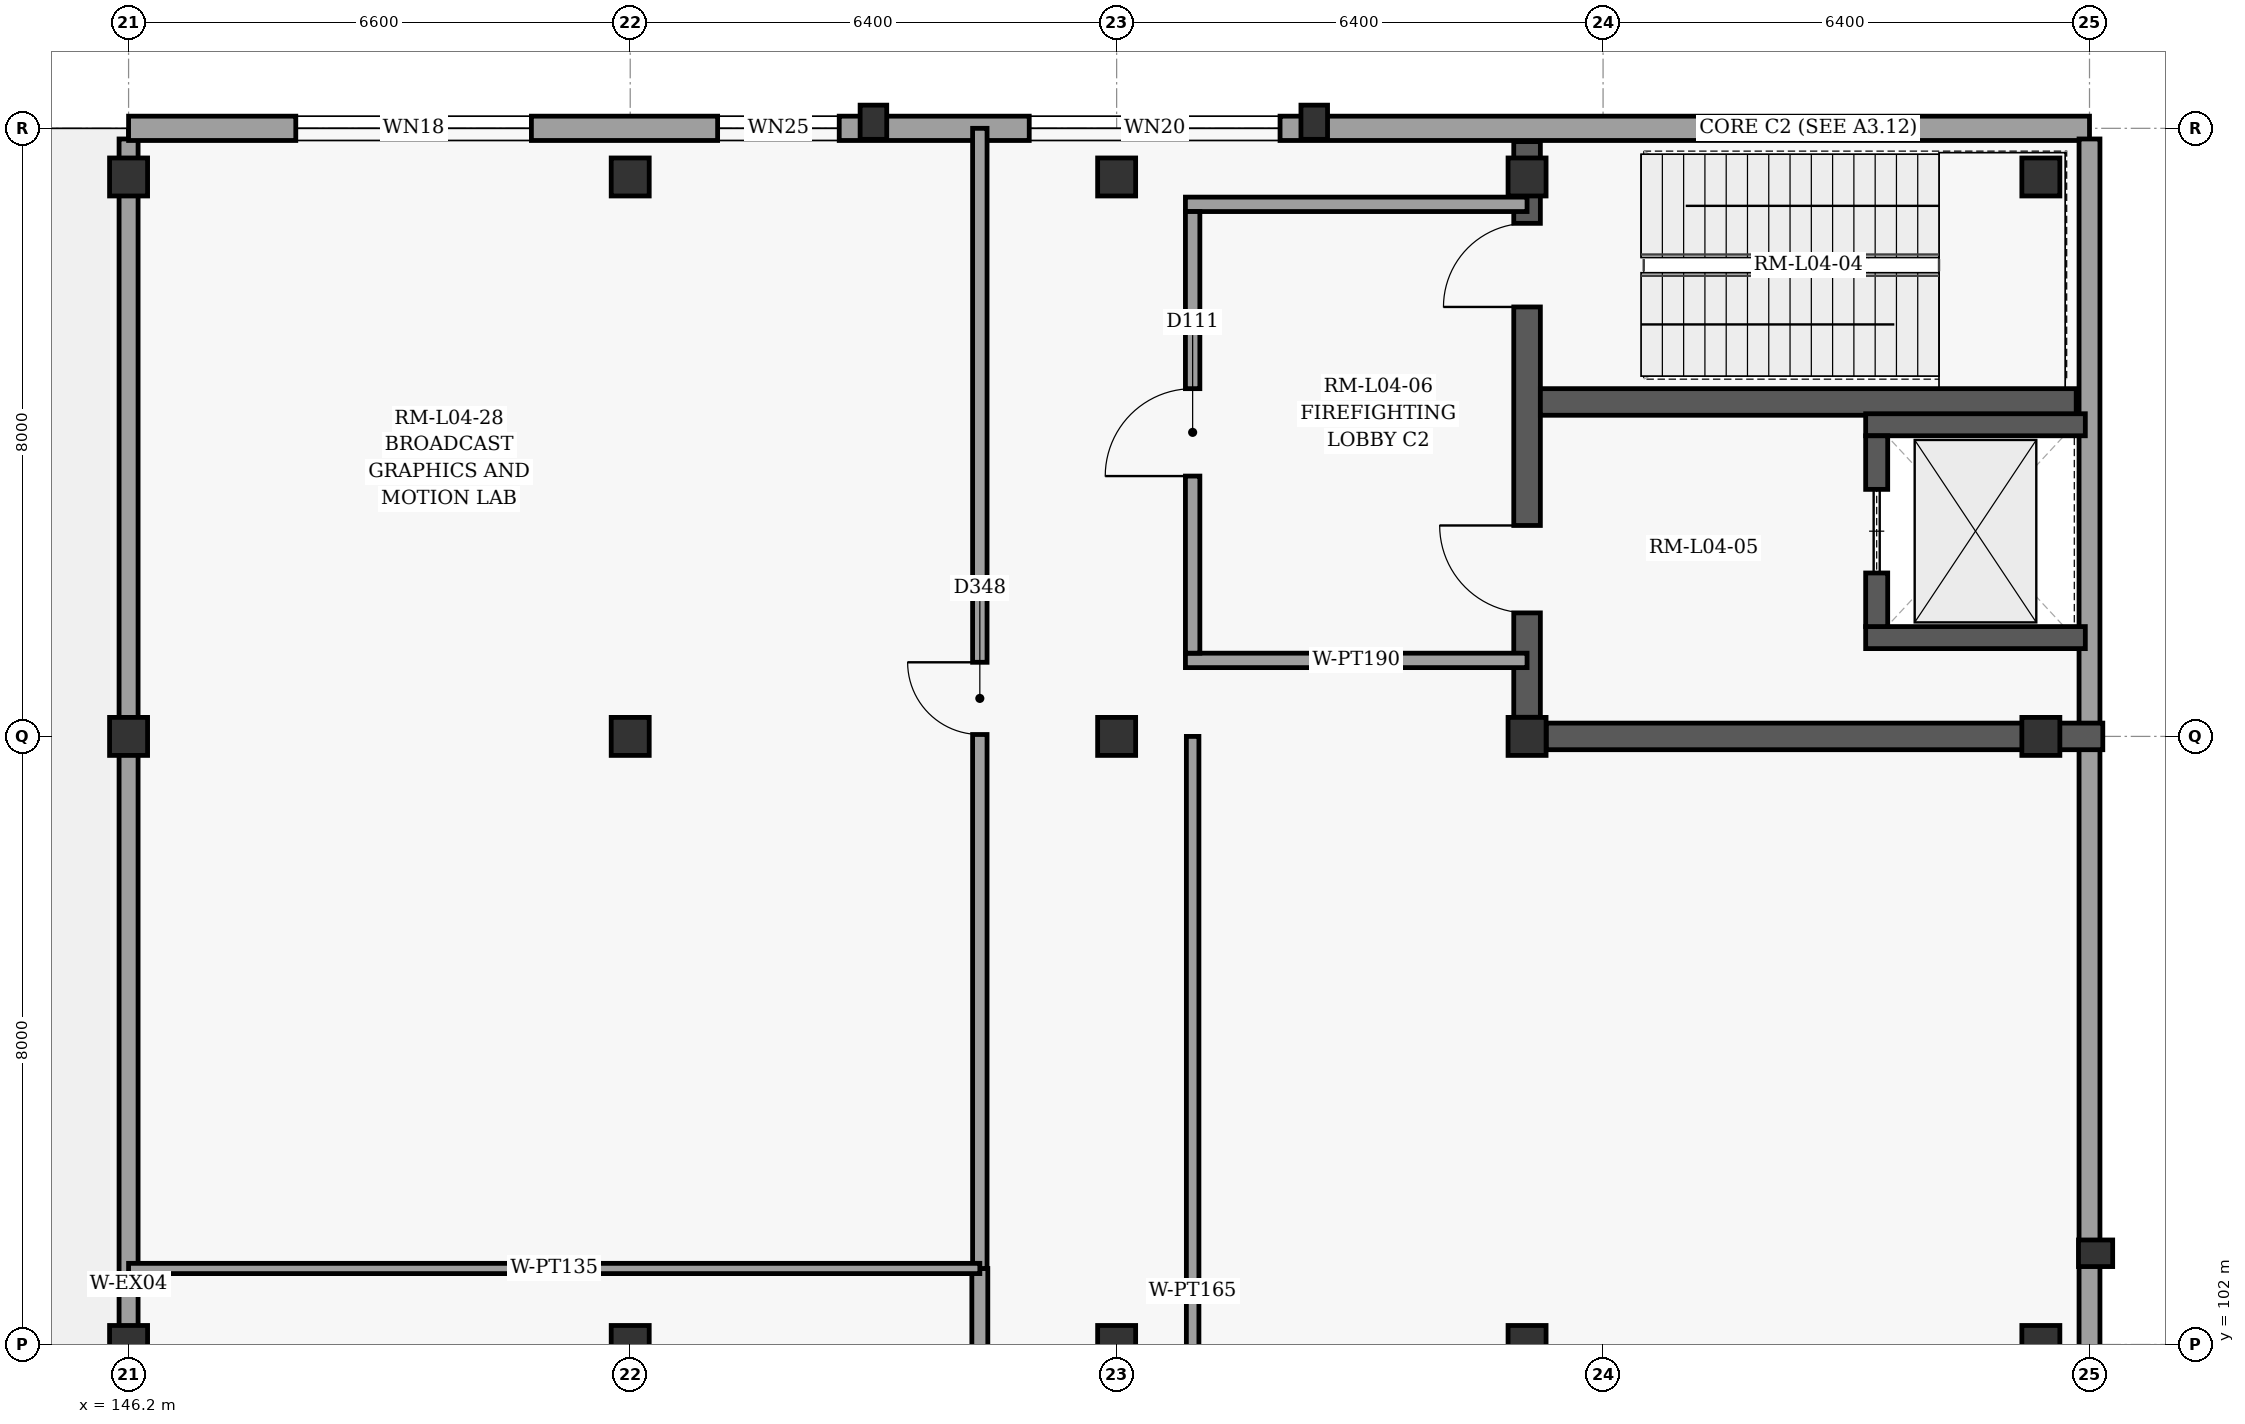
"""IFC4 building model, lengths in metres.
Left out: names, types, materials, properties, quantities, classifications, styles, units other than length and angle.
Written with IfcOpenShell. Run it as: python <this file> out.ifc"""

import sys

from ifc_helpers import new_model, si_unit, direction, frame, frame_2d, origin, origin_2d, place, context, subcontext, project, spatial, rectangle, extrude, element, fill, save


model = new_model("IFC4")
c1 = context("Model", 3, precision=1e-05, world=origin(), true_north=direction((0.0, 1.0)))
c2 = subcontext(c1, "Body", "Model", "MODEL_VIEW")
j1 = project(units=[si_unit("LENGTHUNIT", "METRE"), si_unit("PLANEANGLEUNIT", "RADIAN")], contexts=[c1])
p1 = place(None, origin())
s1 = spatial("IfcSite", under=j1, at=p1, CompositionType="ELEMENT")
p2 = place(p1, origin())
s2 = spatial("IfcBuilding", under=s1, at=p2, CompositionType="ELEMENT")
p3 = place(p2, frame((0.0, 0.0, 20.4)))
s3 = spatial("IfcBuildingStorey", under=s2, at=p3, CompositionType="ELEMENT", Elevation=20.4)
for number, where, z_axis, x_axis in (
    (1, (146.2, 102.0, 0.0), (0.0, 0.0, 1.0), (1.0, 0.0, 0.0)),
    (2, (146.2, 110.0, 0.0), (0.0, 0.0, 1.0), (1.0, 0.0, 0.0)),
    (3, (146.2, 117.36, 0.0), (0.0, 0.0, 1.0), (1.0, 0.0, 0.0)),
    (4, (152.8, 102.0, 0.0), (0.0, 0.0, 1.0), (1.0, 0.0, 0.0)),
    (5, (152.8, 110.0, 0.0), (0.0, 0.0, 1.0), (1.0, 0.0, 0.0)),
    (6, (152.8, 117.36, 0.0), (0.0, 0.0, 1.0), (1.0, 0.0, 0.0)),
    (7, (159.2, 102.0, 0.0), (0.0, 0.0, 1.0), (1.0, 0.0, 0.0)),
    (8, (159.2, 110.0, 0.0), (0.0, 0.0, 1.0), (1.0, 0.0, 0.0)),
    (9, (159.2, 117.36, 0.0), (0.0, 0.0, 1.0), (1.0, 0.0, 0.0)),
    (10, (164.6, 102.0, 0.0), (0.0, 0.0, 1.0), (1.0, 0.0, 0.0)),
    (11, (164.6, 110.0, 0.0), (0.0, 0.0, 1.0), (1.0, 0.0, 0.0)),
    (12, (164.6, 117.36, 0.0), (0.0, 0.0, 1.0), (1.0, 0.0, 0.0)),
    (13, (171.36, 102.0, 0.0), (0.0, 0.0, 1.0), (1.0, 0.0, 0.0)),
    (14, (171.36, 110.0, 0.0), (0.0, 0.0, 1.0), (1.0, 0.0, 0.0)),
    (15, (171.36, 117.36, 0.0), (0.0, 0.0, 1.0), (1.0, 0.0, 0.0)),
):
    element("IfcColumn", number, at=place(p3, frame(where, z_axis=z_axis, x_axis=x_axis)), inside=s3, PredefinedType="COLUMN", context=c2, shape_type="SweptSolid", body=[
        extrude(rectangle(XDim=0.5, YDim=0.5, at=origin_2d()), origin(), (0.0, 0.0, 1.0), 4.5),
    ])
for number, where, z_axis, x_axis in (
    (16, (172.08, 103.2, 0.0), (0.0, 0.0, 1.0), (1.0, 0.0, 0.0)),
    (17, (156.0, 118.08, 0.0), (0.0, 0.0, 1.0), (0.0, 1.0, 0.0)),
    (18, (161.8, 118.08, 0.0), (0.0, 0.0, 1.0), (0.0, 1.0, 0.0)),
):
    element("IfcColumn", number, at=place(p3, frame(where, z_axis=z_axis, x_axis=x_axis)), inside=s3, PredefinedType="PILASTER", context=c2, shape_type="SweptSolid", body=[
        extrude(rectangle(XDim=0.35, YDim=0.45, at=origin_2d()), origin(), (0.0, 0.0, 1.0), 4.5),
    ])
p4 = place(p3, frame((146.2, 87.74, 0.0), z_axis=(0.0, 0.0, 1.0), x_axis=(0.0, 1.0, 0.0)))
e19 = element("IfcWall", 19, at=p4, inside=s3, PredefinedType="SOLIDWALL", context=c2, shape_type="SweptSolid", body=[
    extrude(rectangle(XDim=30.12, YDim=0.25, at=frame_2d((15.06, 0.0))), origin(), (0.0, 0.0, 1.0), 3.45),
])
p5 = place(p3, frame((146.2, 118.0, 0.0), z_axis=(0.0, 0.0, 1.0), x_axis=(1.0, 0.0, 0.0)))
e20 = element("IfcWall", 20, at=p5, inside=s3, PredefinedType="SOLIDWALL", context=c2, shape_type="SweptSolid", body=[
    extrude(rectangle(XDim=25.8, YDim=0.32, at=frame_2d((12.9, 0.0))), origin(), (0.0, 0.0, 1.0), 4.3),
])
p6 = place(p5, frame((2.2, 0.0, 0.9)))
e21 = element("IfcOpeningElement", 21, at=p6, cuts=e20, PredefinedType="OPENING", context=c2, shape_type="SweptSolid", body=[
    extrude(rectangle(XDim=3.1, YDim=2.45, at=frame_2d((1.55, 1.225))), frame((0.0, 0.17, 0.0), z_axis=(0.0, -1.0, 0.0), x_axis=(1.0, 0.0, 0.0)), (0.0, 0.0, 1.0), 0.34),
])
p7 = place(p5, frame((7.75, 0.0, 0.9)))
e22 = element("IfcOpeningElement", 22, at=p7, cuts=e20, PredefinedType="OPENING", context=c2, shape_type="SweptSolid", body=[
    extrude(rectangle(XDim=1.6, YDim=1.65, at=frame_2d((0.8, 0.825))), frame((0.0, 0.17, 0.0), z_axis=(0.0, -1.0, 0.0), x_axis=(1.0, 0.0, 0.0)), (0.0, 0.0, 1.0), 0.34),
])
p8 = place(p5, frame((11.85, 0.0, 0.9)))
e23 = element("IfcOpeningElement", 23, at=p8, cuts=e20, PredefinedType="OPENING", context=c2, shape_type="SweptSolid", body=[
    extrude(rectangle(XDim=3.3, YDim=2.5, at=frame_2d((1.65, 1.25))), frame((0.0, 0.17, 0.0), z_axis=(0.0, -1.0, 0.0), x_axis=(1.0, 0.0, 0.0)), (0.0, 0.0, 1.0), 0.34),
])
p9 = place(p3, frame((172.0, 117.86, 0.0), z_axis=(0.0, 0.0, 1.0), x_axis=(0.0, -1.0, 0.0)))
e24 = element("IfcWall", 24, at=p9, inside=s3, PredefinedType="SOLIDWALL", context=c2, shape_type="SweptSolid", body=[
    extrude(rectangle(XDim=46.12, YDim=0.275, at=frame_2d((23.06, 0.0))), origin(), (0.0, 0.0, 1.0), 4.3),
])
p10 = place(p3, frame((164.852, 110.0, 0.0), z_axis=(0.0, 0.0, 1.0), x_axis=(1.0, 0.0, 0.0)))
e25 = element("IfcWall", 25, at=p10, inside=s3, PredefinedType="SHEAR", context=c2, shape_type="SweptSolid", body=[
    extrude(rectangle(XDim=7.323, YDim=0.35, at=frame_2d((3.662, 0.0))), origin(), (0.0, 0.0, 1.0), 4.3),
])
p11 = place(p3, frame((164.6, 110.252, 0.0), z_axis=(0.0, 0.0, 1.0), x_axis=(0.0, 1.0, 0.0)))
e26 = element("IfcWall", 26, at=p11, inside=s3, PredefinedType="SHEAR", context=c2, shape_type="SweptSolid", body=[
    extrude(rectangle(XDim=7.573, YDim=0.35, at=frame_2d((3.787, 0.0))), origin(), (0.0, 0.0, 1.0), 4.3),
])
p12 = place(p11, frame((5.398, 0.0, 0.0)))
e27 = element("IfcOpeningElement", 27, at=p12, cuts=e26, PredefinedType="OPENING", context=c2, shape_type="SweptSolid", body=[
    extrude(rectangle(XDim=1.1, YDim=2.15, at=frame_2d((0.55, 1.075))), frame((0.0, 0.185, 0.0), z_axis=(0.0, -1.0, 0.0), x_axis=(1.0, 0.0, 0.0)), (0.0, 0.0, 1.0), 0.37),
])
p13 = place(p11, frame((1.373, 0.0, 0.0)))
e28 = element("IfcOpeningElement", 28, at=p13, cuts=e26, PredefinedType="OPENING", context=c2, shape_type="SweptSolid", body=[
    extrude(rectangle(XDim=1.15, YDim=2.2, at=frame_2d((0.575, 1.1))), frame((0.0, 0.185, 0.0), z_axis=(0.0, -1.0, 0.0), x_axis=(1.0, 0.0, 0.0)), (0.0, 0.0, 1.0), 0.37),
])
p14 = place(p3, frame((164.775, 114.4, 0.0), z_axis=(0.0, 0.0, 1.0), x_axis=(1.0, 0.0, 0.0)))
e29 = element("IfcWall", 29, at=p14, inside=s3, PredefinedType="SHEAR", context=c2, shape_type="SweptSolid", body=[
    extrude(rectangle(XDim=7.05, YDim=0.35, at=frame_2d((3.525, 0.0))), origin(), (0.0, 0.0, 1.0), 4.3),
])
for number, where, z_axis, x_axis in (
    (30, (169.055, 111.3, 0.0), (0.0, 0.0, 1.0), (1.0, 0.0, 0.0)),
    (31, (169.055, 114.1, 0.0), (0.0, 0.0, 1.0), (1.0, 0.0, 0.0)),
):
    element("IfcWall", number, at=place(p3, frame(where, z_axis=z_axis, x_axis=x_axis)), inside=s3, PredefinedType="SHEAR", context=c2, shape_type="SweptSolid", body=[
        extrude(rectangle(XDim=2.89, YDim=0.29, at=frame_2d((1.445, 0.0))), origin(), (0.0, 0.0, 1.0), 4.3),
    ])
p15 = place(p3, frame((169.2, 111.445, 0.0), z_axis=(0.0, 0.0, 1.0), x_axis=(0.0, 1.0, 0.0)))
e32 = element("IfcWall", 32, at=p15, inside=s3, PredefinedType="SHEAR", context=c2, shape_type="SweptSolid", body=[
    extrude(rectangle(XDim=2.51, YDim=0.29, at=frame_2d((1.255, 0.0))), origin(), (0.0, 0.0, 1.0), 4.3),
])
p16 = place(p15, frame((0.705, 0.0, 0.0)))
e33 = element("IfcOpeningElement", 33, at=p16, cuts=e32, PredefinedType="OPENING", context=c2, shape_type="SweptSolid", body=[
    extrude(rectangle(XDim=1.1, YDim=2.15, at=frame_2d((0.55, 1.075))), frame((0.0, 0.155, 0.0), z_axis=(0.0, -1.0, 0.0), x_axis=(1.0, 0.0, 0.0)), (0.0, 0.0, 1.0), 0.31),
])
p17 = place(p3, frame((160.105, 111.0, 0.0), z_axis=(0.0, 0.0, 1.0), x_axis=(1.0, 0.0, 0.0)))
e34 = element("IfcWall", 34, at=p17, inside=s3, PredefinedType="PARTITIONING", context=c2, shape_type="SweptSolid", body=[
    extrude(rectangle(XDim=4.495, YDim=0.19, at=frame_2d((2.248, 0.0))), origin(), (0.0, 0.0, 1.0), 4.3),
])
p18 = place(p3, frame((160.105, 117.0, 0.0), z_axis=(0.0, 0.0, 1.0), x_axis=(1.0, 0.0, 0.0)))
e35 = element("IfcWall", 35, at=p18, inside=s3, PredefinedType="PARTITIONING", context=c2, shape_type="SweptSolid", body=[
    extrude(rectangle(XDim=4.495, YDim=0.19, at=frame_2d((2.248, 0.0))), origin(), (0.0, 0.0, 1.0), 3.65),
])
p19 = place(p3, frame((160.2, 111.095, 0.0), z_axis=(0.0, 0.0, 1.0), x_axis=(0.0, 1.0, 0.0)))
e36 = element("IfcWall", 36, at=p19, inside=s3, PredefinedType="PARTITIONING", context=c2, shape_type="SweptSolid", body=[
    extrude(rectangle(XDim=5.81, YDim=0.19, at=frame_2d((2.905, 0.0))), origin(), (0.0, 0.0, 1.0), 4.3),
])
p20 = place(p19, frame((2.33, 0.0, 0.0)))
e37 = element("IfcOpeningElement", 37, at=p20, cuts=e36, PredefinedType="OPENING", context=c2, shape_type="SweptSolid", body=[
    extrude(rectangle(XDim=1.15, YDim=2.2, at=frame_2d((0.575, 1.1))), frame((0.0, 0.105, 0.0), z_axis=(0.0, -1.0, 0.0), x_axis=(1.0, 0.0, 0.0)), (0.0, 0.0, 1.0), 0.21),
])
p21 = place(p3, frame((157.4, 87.6, 0.0), z_axis=(0.0, 0.0, 1.0), x_axis=(0.0, 1.0, 0.0)))
e38 = element("IfcWall", 38, at=p21, inside=s3, PredefinedType="PARTITIONING", context=c2, shape_type="SweptSolid", body=[
    extrude(rectangle(XDim=15.4, YDim=0.21, at=frame_2d((7.7, 0.0))), origin(), (0.0, 0.0, 1.0), 4.3),
])
p22 = place(p21, frame((7.24, 0.0, 0.0)))
e39 = element("IfcOpeningElement", 39, at=p22, cuts=e38, PredefinedType="OPENING", context=c2, shape_type="SweptSolid", body=[
    extrude(rectangle(XDim=0.92, YDim=2.1, at=frame_2d((0.46, 1.05))), frame((0.0, 0.115, 0.0), z_axis=(0.0, -1.0, 0.0), x_axis=(1.0, 0.0, 0.0)), (0.0, 0.0, 1.0), 0.23),
])
p23 = place(p3, frame((157.4, 103.0, 0.0), z_axis=(0.0, 0.0, 1.0), x_axis=(0.0, 1.0, 0.0)))
e40 = element("IfcWall", 40, at=p23, inside=s3, PredefinedType="PARTITIONING", context=c2, shape_type="SweptSolid", body=[
    extrude(rectangle(XDim=15.0, YDim=0.19, at=frame_2d((7.5, 0.0))), origin(), (0.0, 0.0, 1.0), 4.3),
])
p24 = place(p23, frame((7.025, 0.0, 0.0)))
e41 = element("IfcOpeningElement", 41, at=p24, cuts=e40, PredefinedType="OPENING", context=c2, shape_type="SweptSolid", body=[
    extrude(rectangle(XDim=0.95, YDim=2.1, at=frame_2d((0.475, 1.05))), frame((0.0, 0.105, 0.0), z_axis=(0.0, -1.0, 0.0), x_axis=(1.0, 0.0, 0.0)), (0.0, 0.0, 1.0), 0.21),
])
p25 = place(p3, frame((160.2, 110.0, 0.0), z_axis=(0.0, 0.0, 1.0), x_axis=(0.0, -1.0, 0.0)))
e42 = element("IfcWall", 42, at=p25, inside=s3, PredefinedType="PARTITIONING", context=c2, shape_type="SweptSolid", body=[
    extrude(rectangle(XDim=30.4, YDim=0.165, at=frame_2d((15.2, 0.0))), origin(), (0.0, 0.0, 1.0), 4.3),
])
p26 = place(p25, frame((14.58, 0.0, 0.0)))
e43 = element("IfcOpeningElement", 43, at=p26, cuts=e42, PredefinedType="OPENING", context=c2, shape_type="SweptSolid", body=[
    extrude(rectangle(XDim=1.02, YDim=2.1, at=frame_2d((0.51, 1.05))), frame((0.0, 0.093, 0.0), z_axis=(0.0, -1.0, 0.0), x_axis=(1.0, 0.0, 0.0)), (0.0, 0.0, 1.0), 0.185),
])
p27 = place(p25, frame((23.202, 0.0, 0.0)))
e44 = element("IfcOpeningElement", 44, at=p27, cuts=e42, PredefinedType="OPENING", context=c2, shape_type="SweptSolid", body=[
    extrude(rectangle(XDim=1.02, YDim=2.1, at=frame_2d((0.51, 1.05))), frame((0.0, 0.093, 0.0), z_axis=(0.0, -1.0, 0.0), x_axis=(1.0, 0.0, 0.0)), (0.0, 0.0, 1.0), 0.185),
])
p28 = place(p3, frame((146.2, 103.0, 0.0), z_axis=(0.0, 0.0, 1.0), x_axis=(1.0, 0.0, 0.0)))
e45 = element("IfcWall", 45, at=p28, inside=s3, PredefinedType="PARTITIONING", context=c2, shape_type="SweptSolid", body=[
    extrude(rectangle(XDim=11.2, YDim=0.135, at=frame_2d((5.6, 0.0))), origin(), (0.0, 0.0, 1.0), 4.3),
])
p29 = place(p6, origin())
e46 = element("IfcWindow", 46, at=p29, inside=s3, PartitioningType="SINGLE_PANEL", PredefinedType="WINDOW", context=c2, shape_type="SweptSolid", body=[
    extrude(rectangle(XDim=3.1, YDim=2.45, at=frame_2d((1.55, 1.225))), frame((0.0, 0.03, 0.0), z_axis=(0.0, -1.0, 0.0), x_axis=(1.0, 0.0, 0.0)), (0.0, 0.0, 1.0), 0.06),
])
fill(e21, e46)
p30 = place(p7, origin())
e47 = element("IfcWindow", 47, at=p30, inside=s3, PartitioningType="SINGLE_PANEL", PredefinedType="WINDOW", context=c2, shape_type="SweptSolid", body=[
    extrude(rectangle(XDim=1.6, YDim=1.65, at=frame_2d((0.8, 0.825))), frame((0.0, 0.03, 0.0), z_axis=(0.0, -1.0, 0.0), x_axis=(1.0, 0.0, 0.0)), (0.0, 0.0, 1.0), 0.06),
])
fill(e22, e47)
p31 = place(p8, origin())
e48 = element("IfcWindow", 48, at=p31, inside=s3, PartitioningType="SINGLE_PANEL", PredefinedType="WINDOW", context=c2, shape_type="SweptSolid", body=[
    extrude(rectangle(XDim=3.3, YDim=2.5, at=frame_2d((1.65, 1.25))), frame((0.0, 0.03, 0.0), z_axis=(0.0, -1.0, 0.0), x_axis=(1.0, 0.0, 0.0)), (0.0, 0.0, 1.0), 0.06),
])
fill(e23, e48)
p32 = place(p12, origin())
e49 = element("IfcDoor", 49, at=p32, inside=s3, OperationType="SINGLE_SWING_LEFT", PredefinedType="DOOR", context=c2, shape_type="SweptSolid", body=[
    extrude(rectangle(XDim=1.1, YDim=2.15, at=frame_2d((0.55, 1.075))), frame((0.0, 0.025, 0.0), z_axis=(0.0, -1.0, 0.0), x_axis=(1.0, 0.0, 0.0)), (0.0, 0.0, 1.0), 0.05),
])
fill(e27, e49)
p33 = place(p13, origin())
e50 = element("IfcDoor", 50, at=p33, inside=s3, OperationType="SINGLE_SWING_RIGHT", PredefinedType="DOOR", context=c2, shape_type="SweptSolid", body=[
    extrude(rectangle(XDim=1.15, YDim=2.2, at=frame_2d((0.575, 1.1))), frame((0.0, 0.025, 0.0), z_axis=(0.0, -1.0, 0.0), x_axis=(1.0, 0.0, 0.0)), (0.0, 0.0, 1.0), 0.05),
])
fill(e28, e50)
p34 = place(p16, origin())
e51 = element("IfcDoor", 51, at=p34, inside=s3, OperationType="SLIDING_TO_LEFT", PredefinedType="DOOR", context=c2, shape_type="SweptSolid", body=[
    extrude(rectangle(XDim=1.1, YDim=2.15, at=frame_2d((0.55, 1.075))), frame((0.0, 0.025, 0.0), z_axis=(0.0, -1.0, 0.0), x_axis=(1.0, 0.0, 0.0)), (0.0, 0.0, 1.0), 0.05),
])
fill(e33, e51)
p35 = place(p20, origin())
e52 = element("IfcDoor", 52, at=p35, inside=s3, OperationType="SINGLE_SWING_LEFT", PredefinedType="DOOR", context=c2, shape_type="SweptSolid", body=[
    extrude(rectangle(XDim=1.15, YDim=2.2, at=frame_2d((0.575, 1.1))), frame((0.0, 0.025, 0.0), z_axis=(0.0, -1.0, 0.0), x_axis=(1.0, 0.0, 0.0)), (0.0, 0.0, 1.0), 0.05),
])
fill(e37, e52)
p36 = place(p24, origin())
e53 = element("IfcDoor", 53, at=p36, inside=s3, OperationType="SINGLE_SWING_RIGHT", PredefinedType="DOOR", context=c2, shape_type="SweptSolid", body=[
    extrude(rectangle(XDim=0.95, YDim=2.1, at=frame_2d((0.475, 1.05))), frame((0.0, 0.025, 0.0), z_axis=(0.0, -1.0, 0.0), x_axis=(1.0, 0.0, 0.0)), (0.0, 0.0, 1.0), 0.05),
])
fill(e41, e53)
save(model, sys.argv[1])
